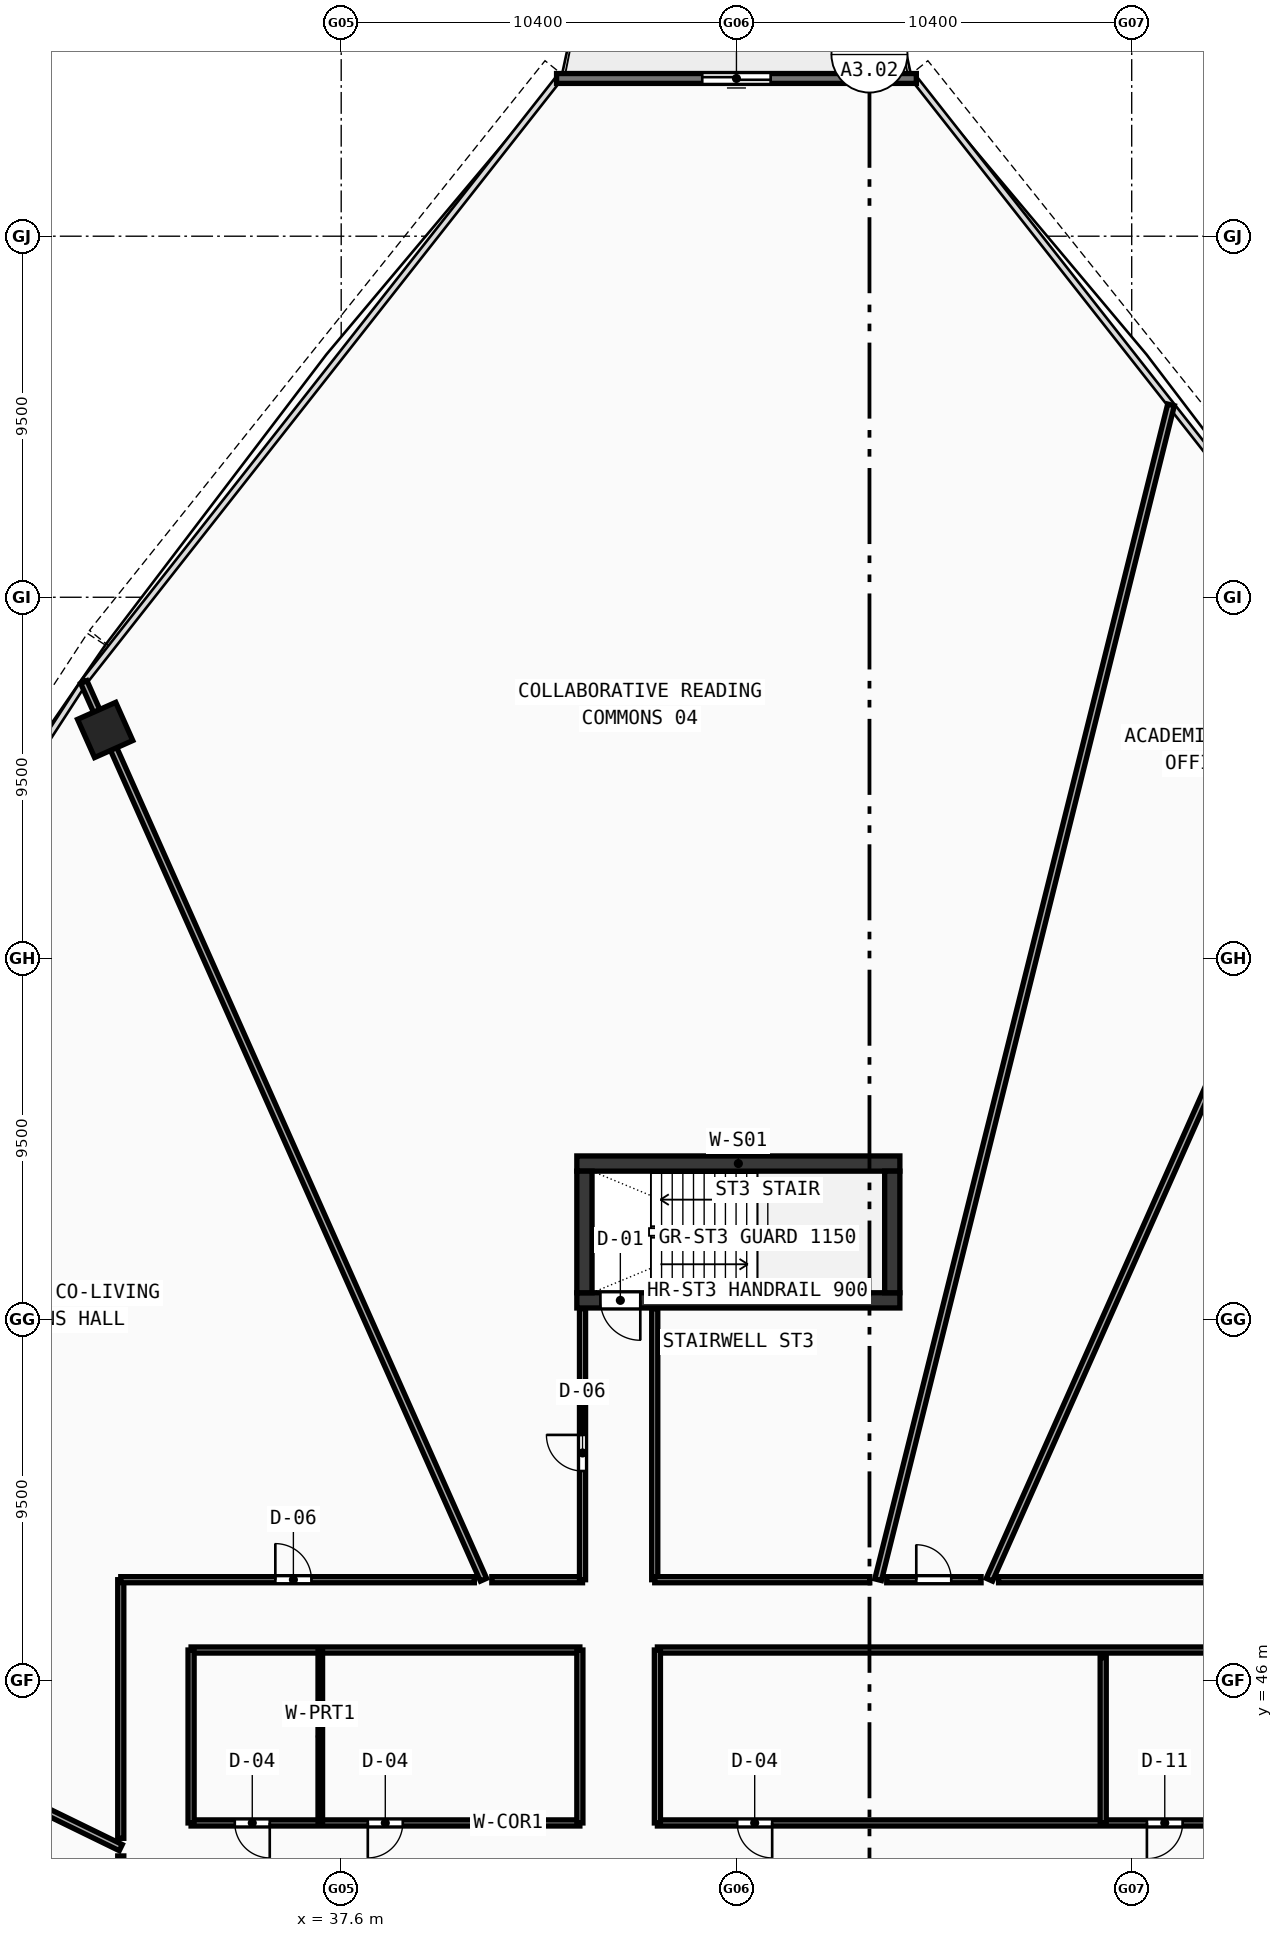
"""IFC4 building model, lengths in metres.
Left out: names, types, materials, properties, quantities, classifications, styles, units other than length and angle.
Written with IfcOpenShell. Run it as: python <this file> out.ifc"""

import sys

from ifc_helpers import new_model, si_unit, direction, frame, frame_2d, origin, origin_with_axes, origin_2d, place, context, subcontext, project, spatial, rectangle, hollow_rectangle, extrude, source, transform, mapped, element, fill, save


model = new_model("IFC4")
c1 = context("Model", 3, precision=1e-05, world=origin(), true_north=direction((0.0, 1.0)))
c2 = subcontext(c1, "Body", "Model", "MODEL_VIEW")
j1 = project(units=[si_unit("LENGTHUNIT", "METRE"), si_unit("PLANEANGLEUNIT", "RADIAN")], contexts=[c1])
p1 = place(None, origin())
s1 = spatial("IfcSite", under=j1, at=p1, CompositionType="ELEMENT")
p2 = place(p1, origin())
s2 = spatial("IfcBuilding", under=s1, at=p2, CompositionType="ELEMENT")
p3 = place(p2, frame((0.0, 0.0, 55.81)))
s3 = spatial("IfcBuildingStorey", under=s2, at=p3, CompositionType="ELEMENT", Elevation=55.81)
p4 = place(p3, frame((43.8, 59.6, 0.0), z_axis=(0.0, 0.0, 1.0), x_axis=(1.0, 0.0, 0.0)))
e1 = element("IfcWall", 1, at=p4, inside=s3, PredefinedType="SHEAR", context=c2, shape_type="SweptSolid", body=[
    extrude(rectangle(XDim=8.5, YDim=0.4, at=frame_2d((4.25, 0.0))), origin(), (0.0, 0.0, 1.0), 3.37),
])
p5 = place(p3, frame((43.8, 56.0, 0.0), z_axis=(0.0, 0.0, 1.0), x_axis=(1.0, 0.0, 0.0)))
e2 = element("IfcWall", 2, at=p5, inside=s3, PredefinedType="SHEAR", context=c2, shape_type="SweptSolid", body=[
    extrude(rectangle(XDim=8.5, YDim=0.4, at=frame_2d((4.25, 0.0))), origin(), (0.0, 0.0, 1.0), 3.37),
])
p6 = place(p5, frame((0.62, 0.0, 0.0)))
e3 = element("IfcOpeningElement", 3, at=p6, cuts=e2, PredefinedType="OPENING", context=c2, shape_type="SweptSolid", body=[
    extrude(rectangle(XDim=1.05, YDim=2.1, at=frame_2d((0.525, 1.05))), frame((0.0, 0.21, 0.0), z_axis=(0.0, -1.0, 0.0), x_axis=(1.0, 0.0, 0.0)), (0.0, 0.0, 1.0), 0.42),
])
for number, where, z_axis, x_axis in (
    (4, (44.0, 56.2, 0.0), (0.0, 0.0, 1.0), (0.0, 1.0, 0.0)),
    (5, (52.1, 56.2, 0.0), (0.0, 0.0, 1.0), (0.0, 1.0, 0.0)),
):
    element("IfcWall", number, at=place(p3, frame(where, z_axis=z_axis, x_axis=x_axis)), inside=s3, PredefinedType="SHEAR", context=c2, shape_type="SweptSolid", body=[
        extrude(rectangle(XDim=3.2, YDim=0.4, at=frame_2d((1.6, 0.0))), origin(), (0.0, 0.0, 1.0), 3.37),
    ])
m1 = source(origin(), c2, "Body", "SweptSolid", [
    extrude(hollow_rectangle(XDim=1.1, YDim=1.1, WallThickness=0.045, at=origin_2d()), origin(), (0.0, 0.0, 1.0), 3.63),
])
p7 = place(p3, frame((31.389, 71.009, -0.26), z_axis=(0.0, 0.0, 1.0), x_axis=(-0.913545457643, -0.406736643076, 0.0)))
e6 = element("IfcColumn", 6, at=p7, inside=s3, PredefinedType="COLUMN", context=c2, shape_type="MappedRepresentation", body=[
    mapped(m1, transform((0.0, 0.0, 0.0), scale=1.0)),
])
p8 = place(p3, frame((52.733, 88.15, 0.0), z_axis=(0.0, 0.0, 1.0), x_axis=(-1.0, 0.0, 0.0)))
e7 = element("IfcWall", 7, at=p8, inside=s3, PredefinedType="STANDARD", context=c2, shape_type="SweptSolid", body=[
    extrude(rectangle(XDim=9.466, YDim=0.26, at=frame_2d((4.733, 0.0))), origin(), (0.0, 0.0, 1.0), 3.37),
])
p9 = place(p8, frame((3.833, 0.0, 0.0)))
e8 = element("IfcOpeningElement", 8, at=p9, cuts=e7, PredefinedType="OPENING", context=c2, shape_type="SweptSolid", body=[
    extrude(rectangle(XDim=1.8, YDim=2.15, at=frame_2d((0.9, 1.075))), frame((0.0, 0.14, 0.0), z_axis=(0.0, -1.0, 0.0), x_axis=(1.0, 0.0, 0.0)), (0.0, 0.0, 1.0), 0.28),
])
p10 = place(p3, frame((33.65, 42.25, 0.0), z_axis=(0.0, 0.0, 1.0), x_axis=(1.0, 0.0, 0.0)))
e9 = element("IfcWall", 9, at=p10, inside=s3, PredefinedType="PARTITIONING", context=c2, shape_type="SweptSolid", body=[
    extrude(rectangle(XDim=10.23, YDim=0.16, at=frame_2d((5.115, 0.0))), origin(), (0.0, 0.0, 1.0), 2.67),
])
p11 = place(p10, frame((1.15, 0.0, 0.0)))
e10 = element("IfcOpeningElement", 10, at=p11, cuts=e9, PredefinedType="OPENING", context=c2, shape_type="SweptSolid", body=[
    extrude(rectangle(XDim=0.92, YDim=2.1, at=frame_2d((0.46, 1.05))), frame((0.0, 0.09, 0.0), z_axis=(0.0, -1.0, 0.0), x_axis=(1.0, 0.0, 0.0)), (0.0, 0.0, 1.0), 0.18),
])
p12 = place(p10, frame((4.65, 0.0, 0.0)))
e11 = element("IfcOpeningElement", 11, at=p12, cuts=e9, PredefinedType="OPENING", context=c2, shape_type="SweptSolid", body=[
    extrude(rectangle(XDim=0.92, YDim=2.1, at=frame_2d((0.46, 1.05))), frame((0.0, 0.09, 0.0), z_axis=(0.0, -1.0, 0.0), x_axis=(1.0, 0.0, 0.0)), (0.0, 0.0, 1.0), 0.18),
])
p13 = place(p3, frame((33.65, 46.8, 0.0), z_axis=(0.0, 0.0, 1.0), x_axis=(1.0, 0.0, 0.0)))
e12 = element("IfcWall", 12, at=p13, inside=s3, PredefinedType="PARTITIONING", context=c2, shape_type="SweptSolid", body=[
    extrude(rectangle(XDim=10.23, YDim=0.16, at=frame_2d((5.115, 0.0))), origin(), (0.0, 0.0, 1.0), 2.67),
])
for number, where, z_axis, x_axis in (
    (13, (33.65, 42.25, 0.0), (0.0, 0.0, 1.0), (0.0, 1.0, 0.0)),
    (14, (43.88, 42.25, 0.0), (0.0, 0.0, 1.0), (0.0, 1.0, 0.0)),
):
    element("IfcWall", number, at=place(p3, frame(where, z_axis=z_axis, x_axis=x_axis)), inside=s3, PredefinedType="PARTITIONING", context=c2, shape_type="SweptSolid", body=[
        extrude(rectangle(XDim=4.55, YDim=0.16, at=frame_2d((2.275, 0.0))), origin(), (0.0, 0.0, 1.0), 2.67),
    ])
p14 = place(p3, frame((37.05, 42.25, 0.0), z_axis=(0.0, 0.0, 1.0), x_axis=(0.0, 1.0, 0.0)))
e15 = element("IfcWall", 15, at=p14, inside=s3, PredefinedType="PARTITIONING", context=c2, shape_type="SweptSolid", body=[
    extrude(rectangle(XDim=4.55, YDim=0.12, at=frame_2d((2.275, 0.0))), origin(), (0.0, 0.0, 1.0), 2.67),
])
p15 = place(p3, frame((45.92, 42.25, 0.0), z_axis=(0.0, 0.0, 1.0), x_axis=(1.0, 0.0, 0.0)))
e16 = element("IfcWall", 16, at=p15, inside=s3, PredefinedType="PARTITIONING", context=c2, shape_type="SweptSolid", body=[
    extrude(rectangle(XDim=15.13, YDim=0.16, at=frame_2d((7.565, 0.0))), origin(), (0.0, 0.0, 1.0), 2.67),
])
p16 = place(p15, frame((2.1, 0.0, 0.0)))
e17 = element("IfcOpeningElement", 17, at=p16, cuts=e16, PredefinedType="OPENING", context=c2, shape_type="SweptSolid", body=[
    extrude(rectangle(XDim=0.92, YDim=2.1, at=frame_2d((0.46, 1.05))), frame((0.0, 0.09, 0.0), z_axis=(0.0, -1.0, 0.0), x_axis=(1.0, 0.0, 0.0)), (0.0, 0.0, 1.0), 0.18),
])
p17 = place(p15, frame((12.88, 0.0, 0.0)))
e18 = element("IfcOpeningElement", 18, at=p17, cuts=e16, PredefinedType="OPENING", context=c2, shape_type="SweptSolid", body=[
    extrude(rectangle(XDim=0.94, YDim=2.1, at=frame_2d((0.47, 1.05))), frame((0.0, 0.09, 0.0), z_axis=(0.0, -1.0, 0.0), x_axis=(1.0, 0.0, 0.0)), (0.0, 0.0, 1.0), 0.18),
])
p18 = place(p3, frame((45.92, 46.8, 0.0), z_axis=(0.0, 0.0, 1.0), x_axis=(1.0, 0.0, 0.0)))
e19 = element("IfcWall", 19, at=p18, inside=s3, PredefinedType="PARTITIONING", context=c2, shape_type="SweptSolid", body=[
    extrude(rectangle(XDim=15.13, YDim=0.16, at=frame_2d((7.565, 0.0))), origin(), (0.0, 0.0, 1.0), 2.67),
])
p19 = place(p3, frame((45.92, 42.25, 0.0), z_axis=(0.0, 0.0, 1.0), x_axis=(0.0, 1.0, 0.0)))
e20 = element("IfcWall", 20, at=p19, inside=s3, PredefinedType="PARTITIONING", context=c2, shape_type="SweptSolid", body=[
    extrude(rectangle(XDim=4.55, YDim=0.16, at=frame_2d((2.275, 0.0))), origin(), (0.0, 0.0, 1.0), 3.37),
])
p20 = place(p3, frame((57.65, 42.25, 0.0), z_axis=(0.0, 0.0, 1.0), x_axis=(0.0, 1.0, 0.0)))
e21 = element("IfcWall", 21, at=p20, inside=s3, PredefinedType="PARTITIONING", context=c2, shape_type="SweptSolid", body=[
    extrude(rectangle(XDim=4.35, YDim=0.16, at=frame_2d((2.175, 0.0))), origin(), (0.0, 0.0, 1.0), 2.67),
])
p21 = place(p3, frame((54.656, 48.65, 0.0), z_axis=(0.0, 0.0, 1.0), x_axis=(0.406729800422, 0.913548504158, 0.0)))
e22 = element("IfcWall", 22, at=p21, inside=s3, PredefinedType="PARTITIONING", context=c2, shape_type="SweptSolid", body=[
    extrude(rectangle(XDim=25.854, YDim=0.18, at=frame_2d((12.927, 0.0))), origin(), (0.0, 0.0, 1.0), 2.67),
])
p22 = place(p3, frame((51.728, 48.65, 0.0), z_axis=(0.0, 0.0, 1.0), x_axis=(0.241918895985, 0.970296474159, 0.0)))
e23 = element("IfcWall", 23, at=p22, inside=s3, PredefinedType="PARTITIONING", context=c2, shape_type="SweptSolid", body=[
    extrude(rectangle(XDim=31.858, YDim=0.18, at=frame_2d((15.929, 0.0))), origin(), (0.0, 0.0, 1.0), 2.67),
])
p23 = place(p3, frame((41.344, 48.65, 0.0), z_axis=(0.0, 0.0, 1.0), x_axis=(-0.406729800422, 0.913548504158, 0.0)))
e24 = element("IfcWall", 24, at=p23, inside=s3, PredefinedType="PARTITIONING", context=c2, shape_type="SweptSolid", body=[
    extrude(rectangle(XDim=25.854, YDim=0.18, at=frame_2d((12.927, 0.0))), origin(), (0.0, 0.0, 1.0), 2.67),
])
p24 = place(p3, frame((31.8, 41.601, 0.0), z_axis=(0.0, 0.0, 1.0), x_axis=(-0.898795978277, 0.438367185625, 0.0)))
e25 = element("IfcWall", 25, at=p24, inside=s3, PredefinedType="PARTITIONING", context=c2, shape_type="SweptSolid", body=[
    extrude(rectangle(XDim=16.788, YDim=0.18, at=frame_2d((8.394, 0.0))), origin(), (0.0, 0.0, 1.0), 2.67),
])
p25 = place(p3, frame((31.8, 38.964, 0.0), z_axis=(0.0, 0.0, 1.0), x_axis=(-0.951052304058, 0.309029958006, 0.0)))
e26 = element("IfcWall", 26, at=p25, inside=s3, PredefinedType="PARTITIONING", context=c2, shape_type="SweptSolid", body=[
    extrude(rectangle(XDim=18.299, YDim=0.18, at=frame_2d((9.149, 0.0))), origin(), (0.0, 0.0, 1.0), 2.67),
])
p26 = place(p3, frame((31.8, 39.195, 0.0), z_axis=(0.0, 0.0, 1.0), x_axis=(0.0, 1.0, 0.0)))
e27 = element("IfcWall", 27, at=p26, inside=s3, PredefinedType="PARTITIONING", context=c2, shape_type="SweptSolid", body=[
    extrude(rectangle(XDim=2.187, YDim=0.16, at=frame_2d((1.093, 0.0))), origin(), (0.0, 0.0, 1.0), 3.37),
])
p27 = place(p26, frame((0.613, 0.0, 0.0)))
e28 = element("IfcOpeningElement", 28, at=p27, cuts=e27, PredefinedType="OPENING", context=c2, shape_type="SweptSolid", body=[
    extrude(rectangle(XDim=0.95, YDim=2.1, at=frame_2d((0.475, 1.05))), frame((0.0, 0.09, 0.0), z_axis=(0.0, -1.0, 0.0), x_axis=(1.0, 0.0, 0.0)), (0.0, 0.0, 1.0), 0.18),
])
p28 = place(p3, frame((31.8, 41.846, 0.0), z_axis=(0.0, 0.0, 1.0), x_axis=(0.0, 1.0, 0.0)))
e29 = element("IfcWall", 29, at=p28, inside=s3, PredefinedType="PARTITIONING", context=c2, shape_type="SweptSolid", body=[
    extrude(rectangle(XDim=6.804, YDim=0.16, at=frame_2d((3.402, 0.0))), origin(), (0.0, 0.0, 1.0), 2.67),
])
p29 = place(p3, frame((31.8, 48.65, 0.0), z_axis=(0.0, 0.0, 1.0), x_axis=(1.0, 0.0, 0.0)))
e30 = element("IfcWall", 30, at=p29, inside=s3, PredefinedType="PARTITIONING", context=c2, shape_type="SweptSolid", body=[
    extrude(rectangle(XDim=9.303, YDim=0.16, at=frame_2d((4.651, 0.0))), origin(), (0.0, 0.0, 1.0), 2.97),
])
p30 = place(p29, frame((4.067, 0.0, 0.0)))
e31 = element("IfcOpeningElement", 31, at=p30, cuts=e30, PredefinedType="OPENING", context=c2, shape_type="SweptSolid", body=[
    extrude(rectangle(XDim=0.95, YDim=2.1, at=frame_2d((0.475, 1.05))), frame((0.0, 0.09, 0.0), z_axis=(0.0, -1.0, 0.0), x_axis=(1.0, 0.0, 0.0)), (0.0, 0.0, 1.0), 0.18),
])
p31 = place(p3, frame((41.564, 48.65, 0.0), z_axis=(0.0, 0.0, 1.0), x_axis=(1.0, 0.0, 0.0)))
e32 = element("IfcWall", 32, at=p31, inside=s3, PredefinedType="PARTITIONING", context=c2, shape_type="SweptSolid", body=[
    extrude(rectangle(XDim=2.386, YDim=0.16, at=frame_2d((1.193, 0.0))), origin(), (0.0, 0.0, 1.0), 2.67),
])
p32 = place(p3, frame((43.95, 48.65, 0.0), z_axis=(0.0, 0.0, 1.0), x_axis=(0.0, 1.0, 0.0)))
e33 = element("IfcWall", 33, at=p32, inside=s3, PredefinedType="PARTITIONING", context=c2, shape_type="SweptSolid", body=[
    extrude(rectangle(XDim=7.13, YDim=0.16, at=frame_2d((3.565, 0.0))), origin(), (0.0, 0.0, 1.0), 2.97),
])
p33 = place(p32, frame((2.86, 0.0, 0.0)))
e34 = element("IfcOpeningElement", 34, at=p33, cuts=e33, PredefinedType="OPENING", context=c2, shape_type="SweptSolid", body=[
    extrude(rectangle(XDim=0.95, YDim=2.1, at=frame_2d((0.475, 1.05))), frame((0.0, 0.09, 0.0), z_axis=(0.0, -1.0, 0.0), x_axis=(1.0, 0.0, 0.0)), (0.0, 0.0, 1.0), 0.18),
])
p34 = place(p3, frame((45.85, 55.78, 0.0), z_axis=(0.0, 0.0, 1.0), x_axis=(0.0, -1.0, 0.0)))
e35 = element("IfcWall", 35, at=p34, inside=s3, PredefinedType="PARTITIONING", context=c2, shape_type="SweptSolid", body=[
    extrude(rectangle(XDim=7.13, YDim=0.16, at=frame_2d((3.565, 0.0))), origin(), (0.0, 0.0, 1.0), 2.97),
])
p35 = place(p3, frame((45.85, 48.65, 0.0), z_axis=(0.0, 0.0, 1.0), x_axis=(1.0, 0.0, 0.0)))
e36 = element("IfcWall", 36, at=p35, inside=s3, PredefinedType="PARTITIONING", context=c2, shape_type="SweptSolid", body=[
    extrude(rectangle(XDim=5.658, YDim=0.16, at=frame_2d((2.829, 0.0))), origin(), (0.0, 0.0, 1.0), 3.37),
])
p36 = place(p3, frame((51.954, 48.65, 0.0), z_axis=(0.0, 0.0, 1.0), x_axis=(1.0, 0.0, 0.0)))
e37 = element("IfcWall", 37, at=p36, inside=s3, PredefinedType="PARTITIONING", context=c2, shape_type="SweptSolid", body=[
    extrude(rectangle(XDim=2.482, YDim=0.16, at=frame_2d((1.241, 0.0))), origin(), (0.0, 0.0, 1.0), 2.67),
])
p37 = place(p36, frame((0.778, 0.0, 0.0)))
e38 = element("IfcOpeningElement", 38, at=p37, cuts=e37, PredefinedType="OPENING", context=c2, shape_type="SweptSolid", body=[
    extrude(rectangle(XDim=0.92, YDim=2.1, at=frame_2d((0.46, 1.05))), frame((0.0, 0.09, 0.0), z_axis=(0.0, -1.0, 0.0), x_axis=(1.0, 0.0, 0.0)), (0.0, 0.0, 1.0), 0.18),
])
p38 = place(p3, frame((54.897, 48.65, 0.0), z_axis=(0.0, 0.0, 1.0), x_axis=(1.0, 0.0, 0.0)))
e39 = element("IfcWall", 39, at=p38, inside=s3, PredefinedType="PARTITIONING", context=c2, shape_type="SweptSolid", body=[
    extrude(rectangle(XDim=8.003, YDim=0.16, at=frame_2d((4.001, 0.0))), origin(), (0.0, 0.0, 1.0), 2.97),
])
m2 = source(origin(), c2, "Body", "SweptSolid", [
    extrude(rectangle(XDim=1.8, YDim=2.15, at=frame_2d((0.9, 1.075))), frame((0.0, 0.025, 0.0), z_axis=(0.0, -1.0, 0.0), x_axis=(1.0, 0.0, 0.0)), (0.0, 0.0, 1.0), 0.05),
])
p39 = place(p9, origin_with_axes())
e40 = element("IfcDoor", 40, at=p39, inside=s3, OperationType="DOUBLE_DOOR_SLIDING", PredefinedType="DOOR", context=c2, shape_type="MappedRepresentation", body=[
    mapped(m2, transform((0.0, 0.0, 0.0), scale=1.0)),
])
fill(e8, e40)
m3 = source(origin(), c2, "Body", "SweptSolid", [
    extrude(rectangle(XDim=1.05, YDim=2.1, at=frame_2d((0.525, 1.05))), frame((0.0, 0.025, 0.0), z_axis=(0.0, -1.0, 0.0), x_axis=(1.0, 0.0, 0.0)), (0.0, 0.0, 1.0), 0.05),
])
p40 = place(p6, frame((1.05, 0.0, 0.0), z_axis=(0.0, 0.0, 1.0), x_axis=(-1.0, 0.0, 0.0)))
e41 = element("IfcDoor", 41, at=p40, inside=s3, OperationType="SINGLE_SWING_LEFT", PredefinedType="DOOR", context=c2, shape_type="MappedRepresentation", body=[
    mapped(m3, transform((0.0, 0.0, 0.0), scale=1.0)),
])
fill(e3, e41)
m4 = source(origin(), c2, "Body", "SweptSolid", [
    extrude(rectangle(XDim=0.92, YDim=2.1, at=frame_2d((0.46, 1.05))), frame((0.0, 0.025, 0.0), z_axis=(0.0, -1.0, 0.0), x_axis=(1.0, 0.0, 0.0)), (0.0, 0.0, 1.0), 0.05),
])
p41 = place(p11, frame((0.92, 0.0, 0.0), z_axis=(0.0, 0.0, 1.0), x_axis=(-1.0, 0.0, 0.0)))
e42 = element("IfcDoor", 42, at=p41, inside=s3, OperationType="SINGLE_SWING_LEFT", PredefinedType="DOOR", context=c2, shape_type="MappedRepresentation", body=[
    mapped(m4, transform((0.0, 0.0, 0.0), scale=1.0)),
])
fill(e10, e42)
p42 = place(p12, frame((0.92, 0.0, 0.0), z_axis=(0.0, 0.0, 1.0), x_axis=(-1.0, 0.0, 0.0)))
e43 = element("IfcDoor", 43, at=p42, inside=s3, OperationType="SINGLE_SWING_RIGHT", PredefinedType="DOOR", context=c2, shape_type="MappedRepresentation", body=[
    mapped(m4, transform((0.0, 0.0, 0.0), scale=1.0)),
])
fill(e11, e43)
p43 = place(p16, frame((0.92, 0.0, 0.0), z_axis=(0.0, 0.0, 1.0), x_axis=(-1.0, 0.0, 0.0)))
e44 = element("IfcDoor", 44, at=p43, inside=s3, OperationType="SINGLE_SWING_LEFT", PredefinedType="DOOR", context=c2, shape_type="MappedRepresentation", body=[
    mapped(m4, transform((0.0, 0.0, 0.0), scale=1.0)),
])
fill(e17, e44)
m5 = source(origin(), c2, "Body", "SweptSolid", [
    extrude(rectangle(XDim=0.94, YDim=2.1, at=frame_2d((0.47, 1.05))), frame((0.0, 0.025, 0.0), z_axis=(0.0, -1.0, 0.0), x_axis=(1.0, 0.0, 0.0)), (0.0, 0.0, 1.0), 0.05),
])
p44 = place(p17, frame((0.94, 0.0, 0.0), z_axis=(0.0, 0.0, 1.0), x_axis=(-1.0, 0.0, 0.0)))
e45 = element("IfcDoor", 45, at=p44, inside=s3, OperationType="SINGLE_SWING_RIGHT", PredefinedType="DOOR", context=c2, shape_type="MappedRepresentation", body=[
    mapped(m5, transform((0.0, 0.0, 0.0), scale=1.0)),
])
fill(e18, e45)
p45 = place(p37, origin_with_axes())
e46 = element("IfcDoor", 46, at=p45, inside=s3, OperationType="SINGLE_SWING_LEFT", PredefinedType="DOOR", context=c2, shape_type="MappedRepresentation", body=[
    mapped(m4, transform((0.0, 0.0, 0.0), scale=1.0)),
])
fill(e38, e46)
m6 = source(origin(), c2, "Body", "SweptSolid", [
    extrude(rectangle(XDim=0.95, YDim=2.1, at=frame_2d((0.475, 1.05))), frame((0.0, 0.025, 0.0), z_axis=(0.0, -1.0, 0.0), x_axis=(1.0, 0.0, 0.0)), (0.0, 0.0, 1.0), 0.05),
])
p46 = place(p33, origin_with_axes())
e47 = element("IfcDoor", 47, at=p46, inside=s3, OperationType="SINGLE_SWING_RIGHT", PredefinedType="DOOR", context=c2, shape_type="MappedRepresentation", body=[
    mapped(m6, transform((0.0, 0.0, 0.0), scale=1.0)),
])
fill(e34, e47)
p47 = place(p30, origin_with_axes())
e48 = element("IfcDoor", 48, at=p47, inside=s3, OperationType="SINGLE_SWING_LEFT", PredefinedType="DOOR", context=c2, shape_type="MappedRepresentation", body=[
    mapped(m6, transform((0.0, 0.0, 0.0), scale=1.0)),
])
fill(e31, e48)
save(model, sys.argv[1])
